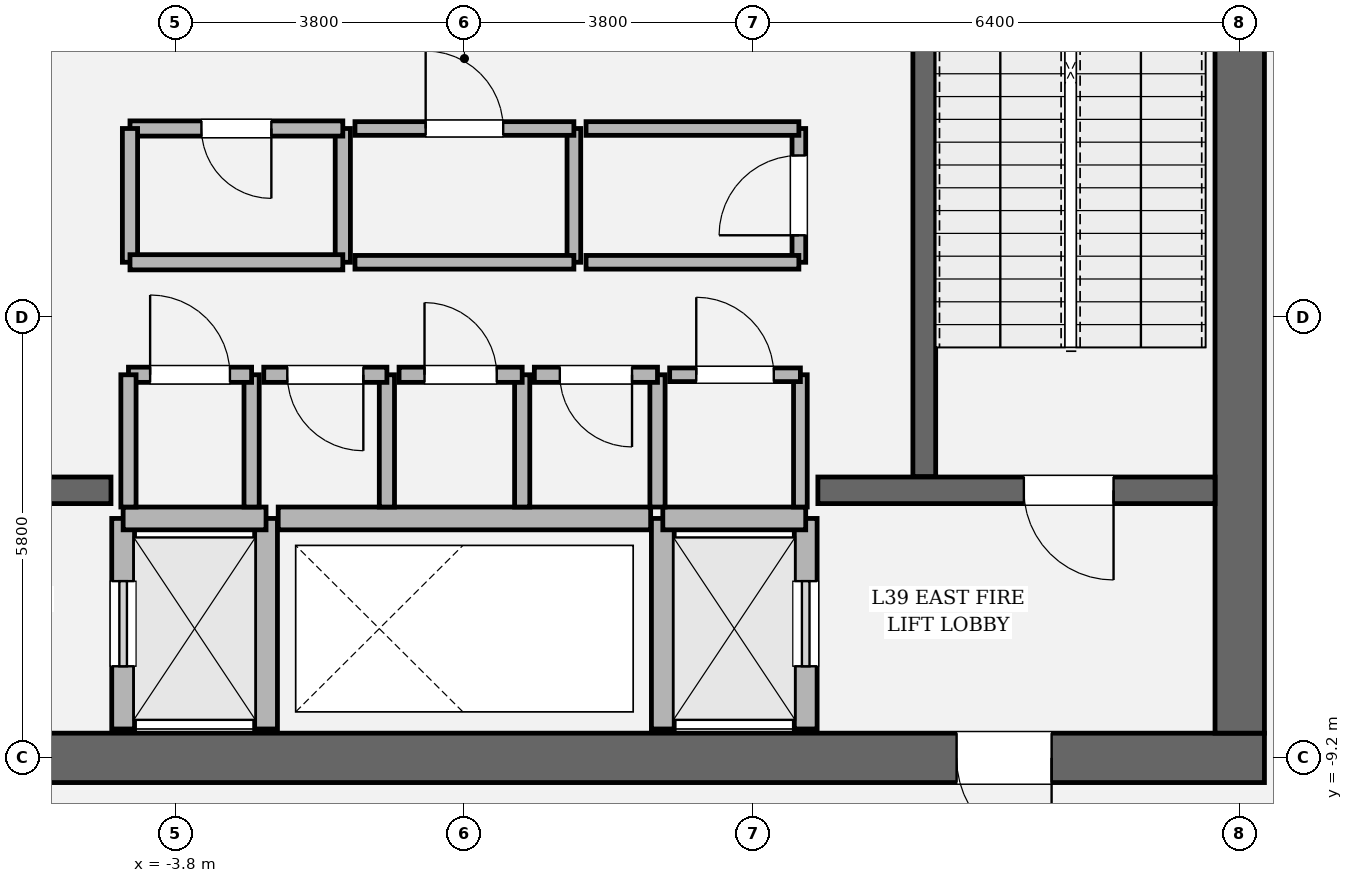
"""IFC4 building model, lengths in metres.
Left out: names, types, materials, properties, quantities, classifications, styles, units other than length and angle.
Written with IfcOpenShell. Run it as: python <this file> out.ifc"""

import sys

from ifc_helpers import new_model, si_unit, direction, frame, frame_2d, origin, place, context, subcontext, project, spatial, rectangle, extrude, element, fill, save


model = new_model("IFC4")
c1 = context("Model", 3, precision=1e-05, world=origin(), true_north=direction((0.0, 1.0)))
c2 = subcontext(c1, "Body", "Model", "MODEL_VIEW")
j1 = project(units=[si_unit("LENGTHUNIT", "METRE"), si_unit("PLANEANGLEUNIT", "RADIAN")], contexts=[c1])
p1 = place(None, origin())
s1 = spatial("IfcSite", under=j1, at=p1, CompositionType="ELEMENT")
p2 = place(p1, origin())
s2 = spatial("IfcBuilding", under=s1, at=p2, CompositionType="ELEMENT")
p3 = place(p2, frame((0.0, 0.0, 168.15)))
s3 = spatial("IfcBuildingStorey", under=s2, at=p3, CompositionType="ELEMENT", Elevation=168.15)
p4 = place(p3, frame((10.525, -9.2, 0.0), z_axis=(0.0, 0.0, 1.0), x_axis=(-1.0, 0.0, 0.0)))
e1 = element("IfcWall", 1, at=p4, inside=s3, PredefinedType="SHEAR", context=c2, shape_type="SweptSolid", body=[
    extrude(rectangle(XDim=21.05, YDim=0.65, at=frame_2d((10.525, 0.0))), origin(), (0.0, 0.0, 1.0), 4.05),
])
p5 = place(p4, frame((2.8, 0.0, 0.0)))
e2 = element("IfcOpeningElement", 2, at=p5, cuts=e1, PredefinedType="OPENING", context=c2, shape_type="SweptSolid", body=[
    extrude(rectangle(XDim=1.25, YDim=2.25, at=frame_2d((0.625, 1.125))), frame((0.0, 0.335, 0.0), z_axis=(0.0, -1.0, 0.0), x_axis=(1.0, 0.0, 0.0)), (0.0, 0.0, 1.0), 0.67),
])
p6 = place(p4, frame((17.0, 0.0, 0.0)))
e3 = element("IfcOpeningElement", 3, at=p6, cuts=e1, PredefinedType="OPENING", context=c2, shape_type="SweptSolid", body=[
    extrude(rectangle(XDim=1.25, YDim=2.25, at=frame_2d((0.625, 1.125))), frame((0.0, 0.335, 0.0), z_axis=(0.0, -1.0, 0.0), x_axis=(1.0, 0.0, 0.0)), (0.0, 0.0, 1.0), 0.67),
])
p7 = place(p3, frame((10.2, 8.875, 0.0), z_axis=(0.0, 0.0, 1.0), x_axis=(0.0, -1.0, 0.0)))
e4 = element("IfcWall", 4, at=p7, inside=s3, PredefinedType="SHEAR", context=c2, shape_type="SweptSolid", body=[
    extrude(rectangle(XDim=17.75, YDim=0.65, at=frame_2d((8.875, 0.0))), origin(), (0.0, 0.0, 1.0), 4.05),
])
p8 = place(p7, frame((3.905, 0.0, 0.0)))
e5 = element("IfcOpeningElement", 5, at=p8, cuts=e4, PredefinedType="OPENING", context=c2, shape_type="SweptSolid", body=[
    extrude(rectangle(XDim=1.18, YDim=2.2, at=frame_2d((0.59, 1.1))), frame((0.0, 0.335, 0.0), z_axis=(0.0, -1.0, 0.0), x_axis=(1.0, 0.0, 0.0)), (0.0, 0.0, 1.0), 0.67),
])
p9 = place(p3, frame((6.05, 3.45, 0.0), z_axis=(0.0, 0.0, 1.0), x_axis=(0.0, -1.0, 0.0)))
e6 = element("IfcWall", 6, at=p9, inside=s3, PredefinedType="SOLIDWALL", context=c2, shape_type="SweptSolid", body=[
    extrude(rectangle(XDim=8.95, YDim=0.3, at=frame_2d((4.475, 0.0))), origin(), (0.0, 0.0, 1.0), 4.05),
])
p10 = place(p3, frame((-9.875, -5.68, 0.0), z_axis=(0.0, 0.0, 1.0), x_axis=(1.0, 0.0, 0.0)))
e7 = element("IfcWall", 7, at=p10, inside=s3, PredefinedType="SOLIDWALL", context=c2, shape_type="SweptSolid", body=[
    extrude(rectangle(XDim=5.225, YDim=0.35, at=frame_2d((2.613, 0.0))), origin(), (0.0, 0.0, 1.0), 4.05),
])
p11 = place(p10, frame((1.335, 0.0, 0.0)))
e8 = element("IfcOpeningElement", 8, at=p11, cuts=e7, PredefinedType="OPENING", context=c2, shape_type="SweptSolid", body=[
    extrude(rectangle(XDim=1.18, YDim=2.2, at=frame_2d((0.59, 1.1))), frame((0.0, 0.185, 0.0), z_axis=(0.0, -1.0, 0.0), x_axis=(1.0, 0.0, 0.0)), (0.0, 0.0, 1.0), 0.37),
])
p12 = place(p3, frame((4.65, -5.68, 0.0), z_axis=(0.0, 0.0, 1.0), x_axis=(1.0, 0.0, 0.0)))
e9 = element("IfcWall", 9, at=p12, inside=s3, PredefinedType="SOLIDWALL", context=c2, shape_type="SweptSolid", body=[
    extrude(rectangle(XDim=5.225, YDim=0.35, at=frame_2d((2.613, 0.0))), origin(), (0.0, 0.0, 1.0), 4.05),
])
p13 = place(p12, frame((2.71, 0.0, 0.0)))
e10 = element("IfcOpeningElement", 10, at=p13, cuts=e9, PredefinedType="OPENING", context=c2, shape_type="SweptSolid", body=[
    extrude(rectangle(XDim=1.18, YDim=2.2, at=frame_2d((0.59, 1.1))), frame((0.0, 0.185, 0.0), z_axis=(0.0, -1.0, 0.0), x_axis=(1.0, 0.0, 0.0)), (0.0, 0.0, 1.0), 0.37),
])
p14 = place(p3, frame((-4.49, -8.82, 0.0), z_axis=(0.0, 0.0, 1.0), x_axis=(0.0, 1.0, 0.0)))
e11 = element("IfcWall", 11, at=p14, inside=s3, PredefinedType="SOLIDWALL", context=c2, shape_type="SweptSolid", body=[
    extrude(rectangle(XDim=2.77, YDim=0.3, at=frame_2d((1.385, 0.0))), origin(), (0.0, 0.0, 1.0), 3.77),
])
p15 = place(p14, frame((0.825, 0.0, 0.0)))
e12 = element("IfcOpeningElement", 12, at=p15, cuts=e11, PredefinedType="OPENING", context=c2, shape_type="SweptSolid", body=[
    extrude(rectangle(XDim=1.12, YDim=2.25, at=frame_2d((0.56, 1.125))), frame((0.0, 0.16, 0.0), z_axis=(0.0, -1.0, 0.0), x_axis=(1.0, 0.0, 0.0)), (0.0, 0.0, 1.0), 0.32),
])
p16 = place(p3, frame((-2.61, -8.82, 0.0), z_axis=(0.0, 0.0, 1.0), x_axis=(0.0, 1.0, 0.0)))
e13 = element("IfcWall", 13, at=p16, inside=s3, PredefinedType="SOLIDWALL", context=c2, shape_type="SweptSolid", body=[
    extrude(rectangle(XDim=2.77, YDim=0.3, at=frame_2d((1.385, 0.0))), origin(), (0.0, 0.0, 1.0), 3.77),
])
p17 = place(p3, frame((-4.49, -6.05, 0.0), z_axis=(0.0, 0.0, 1.0), x_axis=(1.0, 0.0, 0.0)))
e14 = element("IfcWall", 14, at=p17, inside=s3, PredefinedType="SOLIDWALL", context=c2, shape_type="SweptSolid", body=[
    extrude(rectangle(XDim=1.88, YDim=0.3, at=frame_2d((0.94, 0.0))), origin(), (0.0, 0.0, 1.0), 3.77),
])
p18 = place(p3, frame((4.49, -8.82, 0.0), z_axis=(0.0, 0.0, 1.0), x_axis=(0.0, 1.0, 0.0)))
e15 = element("IfcWall", 15, at=p18, inside=s3, PredefinedType="SOLIDWALL", context=c2, shape_type="SweptSolid", body=[
    extrude(rectangle(XDim=2.77, YDim=0.3, at=frame_2d((1.385, 0.0))), origin(), (0.0, 0.0, 1.0), 3.77),
])
p19 = place(p18, frame((0.825, 0.0, 0.0)))
e16 = element("IfcOpeningElement", 16, at=p19, cuts=e15, PredefinedType="OPENING", context=c2, shape_type="SweptSolid", body=[
    extrude(rectangle(XDim=1.12, YDim=2.25, at=frame_2d((0.56, 1.125))), frame((0.0, 0.16, 0.0), z_axis=(0.0, -1.0, 0.0), x_axis=(1.0, 0.0, 0.0)), (0.0, 0.0, 1.0), 0.32),
])
p20 = place(p3, frame((2.61, -8.82, 0.0), z_axis=(0.0, 0.0, 1.0), x_axis=(0.0, 1.0, 0.0)))
e17 = element("IfcWall", 17, at=p20, inside=s3, PredefinedType="SOLIDWALL", context=c2, shape_type="SweptSolid", body=[
    extrude(rectangle(XDim=2.77, YDim=0.3, at=frame_2d((1.385, 0.0))), origin(), (0.0, 0.0, 1.0), 3.77),
])
p21 = place(p3, frame((2.61, -6.05, 0.0), z_axis=(0.0, 0.0, 1.0), x_axis=(1.0, 0.0, 0.0)))
e18 = element("IfcWall", 18, at=p21, inside=s3, PredefinedType="SOLIDWALL", context=c2, shape_type="SweptSolid", body=[
    extrude(rectangle(XDim=1.88, YDim=0.3, at=frame_2d((0.94, 0.0))), origin(), (0.0, 0.0, 1.0), 3.77),
])
p22 = place(p3, frame((-2.45, -6.05, 0.0), z_axis=(0.0, 0.0, 1.0), x_axis=(1.0, 0.0, 0.0)))
e19 = element("IfcWall", 19, at=p22, inside=s3, PredefinedType="SOLIDWALL", context=c2, shape_type="SweptSolid", body=[
    extrude(rectangle(XDim=4.9, YDim=0.3, at=frame_2d((2.45, 0.0))), origin(), (0.0, 0.0, 1.0), 3.77),
])
p23 = place(p3, frame((-2.8, -5.9, 0.0), z_axis=(0.0, 0.0, 1.0), x_axis=(0.0, 1.0, 0.0)))
e20 = element("IfcWall", 20, at=p23, inside=s3, PredefinedType="SOLIDWALL", context=c2, shape_type="SweptSolid", body=[
    extrude(rectangle(XDim=1.74, YDim=0.2, at=frame_2d((0.87, 0.0))), origin(), (0.0, 0.0, 1.0), 3.77),
])
p24 = place(p3, frame((-2.8, -4.16, 0.0), z_axis=(0.0, 0.0, 1.0), x_axis=(-1.0, 0.0, 0.0)))
e21 = element("IfcWall", 21, at=p24, inside=s3, PredefinedType="SOLIDWALL", context=c2, shape_type="SweptSolid", body=[
    extrude(rectangle(XDim=1.62, YDim=0.2, at=frame_2d((0.81, 0.0))), origin(), (0.0, 0.0, 1.0), 3.77),
])
p25 = place(p24, frame((0.285, 0.0, 0.0)))
e22 = element("IfcOpeningElement", 22, at=p25, cuts=e21, PredefinedType="OPENING", context=c2, shape_type="SweptSolid", body=[
    extrude(rectangle(XDim=1.05, YDim=2.2, at=frame_2d((0.525, 1.1))), frame((0.0, 0.11, 0.0), z_axis=(0.0, -1.0, 0.0), x_axis=(1.0, 0.0, 0.0)), (0.0, 0.0, 1.0), 0.22),
])
for number, where, z_axis, x_axis in (
    (23, (-4.42, -4.16, 0.0), (0.0, 0.0, 1.0), (0.0, -1.0, 0.0)),
    (24, (-1.02, -5.9, 0.0), (0.0, 0.0, 1.0), (0.0, 1.0, 0.0)),
):
    element("IfcWall", number, at=place(p3, frame(where, z_axis=z_axis, x_axis=x_axis)), inside=s3, PredefinedType="SOLIDWALL", context=c2, shape_type="SweptSolid", body=[
        extrude(rectangle(XDim=1.74, YDim=0.2, at=frame_2d((0.87, 0.0))), origin(), (0.0, 0.0, 1.0), 3.77),
    ])
p26 = place(p3, frame((-1.02, -4.16, 0.0), z_axis=(0.0, 0.0, 1.0), x_axis=(-1.0, 0.0, 0.0)))
e25 = element("IfcWall", 25, at=p26, inside=s3, PredefinedType="SOLIDWALL", context=c2, shape_type="SweptSolid", body=[
    extrude(rectangle(XDim=1.62, YDim=0.2, at=frame_2d((0.81, 0.0))), origin(), (0.0, 0.0, 1.0), 3.77),
])
p27 = place(p26, frame((0.31, 0.0, 0.0)))
e26 = element("IfcOpeningElement", 26, at=p27, cuts=e25, PredefinedType="OPENING", context=c2, shape_type="SweptSolid", body=[
    extrude(rectangle(XDim=1.0, YDim=2.15, at=frame_2d((0.5, 1.075))), frame((0.0, 0.11, 0.0), z_axis=(0.0, -1.0, 0.0), x_axis=(1.0, 0.0, 0.0)), (0.0, 0.0, 1.0), 0.22),
])
p28 = place(p3, frame((0.76, -5.9, 0.0), z_axis=(0.0, 0.0, 1.0), x_axis=(0.0, 1.0, 0.0)))
e27 = element("IfcWall", 27, at=p28, inside=s3, PredefinedType="SOLIDWALL", context=c2, shape_type="SweptSolid", body=[
    extrude(rectangle(XDim=1.74, YDim=0.2, at=frame_2d((0.87, 0.0))), origin(), (0.0, 0.0, 1.0), 3.77),
])
p29 = place(p3, frame((0.76, -4.16, 0.0), z_axis=(0.0, 0.0, 1.0), x_axis=(-1.0, 0.0, 0.0)))
e28 = element("IfcWall", 28, at=p29, inside=s3, PredefinedType="SOLIDWALL", context=c2, shape_type="SweptSolid", body=[
    extrude(rectangle(XDim=1.62, YDim=0.2, at=frame_2d((0.81, 0.0))), origin(), (0.0, 0.0, 1.0), 3.77),
])
p30 = place(p29, frame((0.335, 0.0, 0.0)))
e29 = element("IfcOpeningElement", 29, at=p30, cuts=e28, PredefinedType="OPENING", context=c2, shape_type="SweptSolid", body=[
    extrude(rectangle(XDim=0.95, YDim=2.15, at=frame_2d((0.475, 1.075))), frame((0.0, 0.11, 0.0), z_axis=(0.0, -1.0, 0.0), x_axis=(1.0, 0.0, 0.0)), (0.0, 0.0, 1.0), 0.22),
])
p31 = place(p3, frame((2.54, -5.9, 0.0), z_axis=(0.0, 0.0, 1.0), x_axis=(0.0, 1.0, 0.0)))
e30 = element("IfcWall", 30, at=p31, inside=s3, PredefinedType="SOLIDWALL", context=c2, shape_type="SweptSolid", body=[
    extrude(rectangle(XDim=1.74, YDim=0.2, at=frame_2d((0.87, 0.0))), origin(), (0.0, 0.0, 1.0), 3.77),
])
p32 = place(p3, frame((2.54, -4.16, 0.0), z_axis=(0.0, 0.0, 1.0), x_axis=(-1.0, 0.0, 0.0)))
e31 = element("IfcWall", 31, at=p32, inside=s3, PredefinedType="SOLIDWALL", context=c2, shape_type="SweptSolid", body=[
    extrude(rectangle(XDim=1.62, YDim=0.2, at=frame_2d((0.81, 0.0))), origin(), (0.0, 0.0, 1.0), 3.77),
])
p33 = place(p32, frame((0.335, 0.0, 0.0)))
e32 = element("IfcOpeningElement", 32, at=p33, cuts=e31, PredefinedType="OPENING", context=c2, shape_type="SweptSolid", body=[
    extrude(rectangle(XDim=0.95, YDim=2.15, at=frame_2d((0.475, 1.075))), frame((0.0, 0.11, 0.0), z_axis=(0.0, -1.0, 0.0), x_axis=(1.0, 0.0, 0.0)), (0.0, 0.0, 1.0), 0.22),
])
p34 = place(p3, frame((4.42, -5.9, 0.0), z_axis=(0.0, 0.0, 1.0), x_axis=(0.0, 1.0, 0.0)))
e33 = element("IfcWall", 33, at=p34, inside=s3, PredefinedType="PARTITIONING", context=c2, shape_type="SweptSolid", body=[
    extrude(rectangle(XDim=1.74, YDim=0.18, at=frame_2d((0.87, 0.0))), origin(), (0.0, 0.0, 1.0), 3.77),
])
p35 = place(p3, frame((4.42, -4.16, 0.0), z_axis=(0.0, 0.0, 1.0), x_axis=(-1.0, 0.0, 0.0)))
e34 = element("IfcWall", 34, at=p35, inside=s3, PredefinedType="PARTITIONING", context=c2, shape_type="SweptSolid", body=[
    extrude(rectangle(XDim=1.72, YDim=0.18, at=frame_2d((0.86, 0.0))), origin(), (0.0, 0.0, 1.0), 3.77),
])
p36 = place(p35, frame((0.35, 0.0, 0.0)))
e35 = element("IfcOpeningElement", 35, at=p36, cuts=e34, PredefinedType="OPENING", context=c2, shape_type="SweptSolid", body=[
    extrude(rectangle(XDim=1.02, YDim=2.2, at=frame_2d((0.51, 1.1))), frame((0.0, 0.1, 0.0), z_axis=(0.0, -1.0, 0.0), x_axis=(1.0, 0.0, 0.0)), (0.0, 0.0, 1.0), 0.2),
])
p37 = place(p3, frame((-1.6, -2.68, 0.0), z_axis=(0.0, 0.0, 1.0), x_axis=(0.0, 1.0, 0.0)))
e36 = element("IfcWall", 36, at=p37, inside=s3, PredefinedType="SOLIDWALL", context=c2, shape_type="SweptSolid", body=[
    extrude(rectangle(XDim=1.76, YDim=0.2, at=frame_2d((0.88, 0.0))), origin(), (0.0, 0.0, 1.0), 3.77),
])
p38 = place(p3, frame((-1.6, -0.92, 0.0), z_axis=(0.0, 0.0, 1.0), x_axis=(-1.0, 0.0, 0.0)))
e37 = element("IfcWall", 37, at=p38, inside=s3, PredefinedType="SOLIDWALL", context=c2, shape_type="SweptSolid", body=[
    extrude(rectangle(XDim=2.8, YDim=0.2, at=frame_2d((1.4, 0.0))), origin(), (0.0, 0.0, 1.0), 3.77),
])
p39 = place(p38, frame((0.94, 0.0, 0.0)))
e38 = element("IfcOpeningElement", 38, at=p39, cuts=e37, PredefinedType="OPENING", context=c2, shape_type="SweptSolid", body=[
    extrude(rectangle(XDim=0.92, YDim=2.1, at=frame_2d((0.46, 1.05))), frame((0.0, 0.11, 0.0), z_axis=(0.0, -1.0, 0.0), x_axis=(1.0, 0.0, 0.0)), (0.0, 0.0, 1.0), 0.22),
])
p40 = place(p3, frame((-4.4, -0.92, 0.0), z_axis=(0.0, 0.0, 1.0), x_axis=(0.0, -1.0, 0.0)))
e39 = element("IfcWall", 39, at=p40, inside=s3, PredefinedType="SOLIDWALL", context=c2, shape_type="SweptSolid", body=[
    extrude(rectangle(XDim=1.76, YDim=0.2, at=frame_2d((0.88, 0.0))), origin(), (0.0, 0.0, 1.0), 3.77),
])
p41 = place(p3, frame((-4.4, -2.68, 0.0), z_axis=(0.0, 0.0, 1.0), x_axis=(1.0, 0.0, 0.0)))
e40 = element("IfcWall", 40, at=p41, inside=s3, PredefinedType="SOLIDWALL", context=c2, shape_type="SweptSolid", body=[
    extrude(rectangle(XDim=2.8, YDim=0.2, at=frame_2d((1.4, 0.0))), origin(), (0.0, 0.0, 1.0), 3.77),
])
p42 = place(p3, frame((1.44, -2.68, 0.0), z_axis=(0.0, 0.0, 1.0), x_axis=(0.0, 1.0, 0.0)))
e41 = element("IfcWall", 41, at=p42, inside=s3, PredefinedType="PARTITIONING", context=c2, shape_type="SweptSolid", body=[
    extrude(rectangle(XDim=1.76, YDim=0.18, at=frame_2d((0.88, 0.0))), origin(), (0.0, 0.0, 1.0), 3.77),
])
p43 = place(p3, frame((1.44, -0.92, 0.0), z_axis=(0.0, 0.0, 1.0), x_axis=(-1.0, 0.0, 0.0)))
e42 = element("IfcWall", 42, at=p43, inside=s3, PredefinedType="PARTITIONING", context=c2, shape_type="SweptSolid", body=[
    extrude(rectangle(XDim=2.88, YDim=0.18, at=frame_2d((1.44, 0.0))), origin(), (0.0, 0.0, 1.0), 3.77),
])
p44 = place(p43, frame((0.93, 0.0, 0.0)))
e43 = element("IfcOpeningElement", 43, at=p44, cuts=e42, PredefinedType="OPENING", context=c2, shape_type="SweptSolid", body=[
    extrude(rectangle(XDim=1.02, YDim=2.2, at=frame_2d((0.51, 1.1))), frame((0.0, 0.1, 0.0), z_axis=(0.0, -1.0, 0.0), x_axis=(1.0, 0.0, 0.0)), (0.0, 0.0, 1.0), 0.2),
])
p45 = place(p3, frame((-1.44, -2.68, 0.0), z_axis=(0.0, 0.0, 1.0), x_axis=(1.0, 0.0, 0.0)))
e44 = element("IfcWall", 44, at=p45, inside=s3, PredefinedType="PARTITIONING", context=c2, shape_type="SweptSolid", body=[
    extrude(rectangle(XDim=2.88, YDim=0.18, at=frame_2d((1.44, 0.0))), origin(), (0.0, 0.0, 1.0), 3.77),
])
p46 = place(p3, frame((4.4, -2.68, 0.0), z_axis=(0.0, 0.0, 1.0), x_axis=(0.0, 1.0, 0.0)))
e45 = element("IfcWall", 45, at=p46, inside=s3, PredefinedType="PARTITIONING", context=c2, shape_type="SweptSolid", body=[
    extrude(rectangle(XDim=1.76, YDim=0.18, at=frame_2d((0.88, 0.0))), origin(), (0.0, 0.0, 1.0), 3.77),
])
p47 = place(p46, frame((0.355, 0.0, 0.0)))
e46 = element("IfcOpeningElement", 46, at=p47, cuts=e45, PredefinedType="OPENING", context=c2, shape_type="SweptSolid", body=[
    extrude(rectangle(XDim=1.05, YDim=2.2, at=frame_2d((0.525, 1.1))), frame((0.0, 0.1, 0.0), z_axis=(0.0, -1.0, 0.0), x_axis=(1.0, 0.0, 0.0)), (0.0, 0.0, 1.0), 0.2),
])
for number, where, z_axis, x_axis in (
    (47, (4.4, -0.92, 0.0), (0.0, 0.0, 1.0), (-1.0, 0.0, 0.0)),
    (48, (1.6, -2.68, 0.0), (0.0, 0.0, 1.0), (1.0, 0.0, 0.0)),
):
    element("IfcWall", number, at=place(p3, frame(where, z_axis=z_axis, x_axis=x_axis)), inside=s3, PredefinedType="PARTITIONING", context=c2, shape_type="SweptSolid", body=[
        extrude(rectangle(XDim=2.8, YDim=0.18, at=frame_2d((1.4, 0.0))), origin(), (0.0, 0.0, 1.0), 3.77),
    ])
p48 = place(p13, origin())
e49 = element("IfcDoor", 49, at=p48, inside=s3, OperationType="SINGLE_SWING_RIGHT", PredefinedType="DOOR", context=c2, shape_type="SweptSolid", body=[
    extrude(rectangle(XDim=1.18, YDim=2.2, at=frame_2d((0.59, 1.1))), frame((0.0, 0.025, 0.0), z_axis=(0.0, -1.0, 0.0), x_axis=(1.0, 0.0, 0.0)), (0.0, 0.0, 1.0), 0.05),
])
fill(e10, e49)
p49 = place(p5, origin())
e50 = element("IfcDoor", 50, at=p49, inside=s3, OperationType="SINGLE_SWING_LEFT", PredefinedType="DOOR", context=c2, shape_type="SweptSolid", body=[
    extrude(rectangle(XDim=1.25, YDim=2.25, at=frame_2d((0.625, 1.125))), frame((0.0, 0.025, 0.0), z_axis=(0.0, -1.0, 0.0), x_axis=(1.0, 0.0, 0.0)), (0.0, 0.0, 1.0), 0.05),
])
fill(e2, e50)
p50 = place(p15, origin())
e51 = element("IfcDoor", 51, at=p50, inside=s3, OperationType="SLIDING_TO_LEFT", PredefinedType="DOOR", context=c2, shape_type="SweptSolid", body=[
    extrude(rectangle(XDim=1.12, YDim=2.25, at=frame_2d((0.56, 1.125))), frame((0.0, 0.025, 0.0), z_axis=(0.0, -1.0, 0.0), x_axis=(1.0, 0.0, 0.0)), (0.0, 0.0, 1.0), 0.05),
])
fill(e12, e51)
p51 = place(p19, origin())
e52 = element("IfcDoor", 52, at=p51, inside=s3, OperationType="SLIDING_TO_RIGHT", PredefinedType="DOOR", context=c2, shape_type="SweptSolid", body=[
    extrude(rectangle(XDim=1.12, YDim=2.25, at=frame_2d((0.56, 1.125))), frame((0.0, 0.025, 0.0), z_axis=(0.0, -1.0, 0.0), x_axis=(1.0, 0.0, 0.0)), (0.0, 0.0, 1.0), 0.05),
])
fill(e16, e52)
p52 = place(p25, origin())
e53 = element("IfcDoor", 53, at=p52, inside=s3, OperationType="SINGLE_SWING_RIGHT", PredefinedType="DOOR", context=c2, shape_type="SweptSolid", body=[
    extrude(rectangle(XDim=1.05, YDim=2.2, at=frame_2d((0.525, 1.1))), frame((0.0, 0.025, 0.0), z_axis=(0.0, -1.0, 0.0), x_axis=(1.0, 0.0, 0.0)), (0.0, 0.0, 1.0), 0.05),
])
fill(e22, e53)
p53 = place(p27, origin())
e54 = element("IfcDoor", 54, at=p53, inside=s3, OperationType="SINGLE_SWING_LEFT", PredefinedType="DOOR", context=c2, shape_type="SweptSolid", body=[
    extrude(rectangle(XDim=1.0, YDim=2.15, at=frame_2d((0.5, 1.075))), frame((0.0, 0.025, 0.0), z_axis=(0.0, -1.0, 0.0), x_axis=(1.0, 0.0, 0.0)), (0.0, 0.0, 1.0), 0.05),
])
fill(e26, e54)
p54 = place(p30, origin())
e55 = element("IfcDoor", 55, at=p54, inside=s3, OperationType="SINGLE_SWING_RIGHT", PredefinedType="DOOR", context=c2, shape_type="SweptSolid", body=[
    extrude(rectangle(XDim=0.95, YDim=2.15, at=frame_2d((0.475, 1.075))), frame((0.0, 0.025, 0.0), z_axis=(0.0, -1.0, 0.0), x_axis=(1.0, 0.0, 0.0)), (0.0, 0.0, 1.0), 0.05),
])
fill(e29, e55)
p55 = place(p33, origin())
e56 = element("IfcDoor", 56, at=p55, inside=s3, OperationType="SINGLE_SWING_LEFT", PredefinedType="DOOR", context=c2, shape_type="SweptSolid", body=[
    extrude(rectangle(XDim=0.95, YDim=2.15, at=frame_2d((0.475, 1.075))), frame((0.0, 0.025, 0.0), z_axis=(0.0, -1.0, 0.0), x_axis=(1.0, 0.0, 0.0)), (0.0, 0.0, 1.0), 0.05),
])
fill(e32, e56)
p56 = place(p36, origin())
e57 = element("IfcDoor", 57, at=p56, inside=s3, OperationType="SINGLE_SWING_RIGHT", PredefinedType="DOOR", context=c2, shape_type="SweptSolid", body=[
    extrude(rectangle(XDim=1.02, YDim=2.2, at=frame_2d((0.51, 1.1))), frame((0.0, 0.025, 0.0), z_axis=(0.0, -1.0, 0.0), x_axis=(1.0, 0.0, 0.0)), (0.0, 0.0, 1.0), 0.05),
])
fill(e35, e57)
p57 = place(p39, origin())
e58 = element("IfcDoor", 58, at=p57, inside=s3, OperationType="SINGLE_SWING_LEFT", PredefinedType="DOOR", context=c2, shape_type="SweptSolid", body=[
    extrude(rectangle(XDim=0.92, YDim=2.1, at=frame_2d((0.46, 1.05))), frame((0.0, 0.025, 0.0), z_axis=(0.0, -1.0, 0.0), x_axis=(1.0, 0.0, 0.0)), (0.0, 0.0, 1.0), 0.05),
])
fill(e38, e58)
p58 = place(p44, origin())
e59 = element("IfcDoor", 59, at=p58, inside=s3, OperationType="SINGLE_SWING_RIGHT", PredefinedType="DOOR", context=c2, shape_type="SweptSolid", body=[
    extrude(rectangle(XDim=1.02, YDim=2.2, at=frame_2d((0.51, 1.1))), frame((0.0, 0.025, 0.0), z_axis=(0.0, -1.0, 0.0), x_axis=(1.0, 0.0, 0.0)), (0.0, 0.0, 1.0), 0.05),
])
fill(e43, e59)
p59 = place(p47, origin())
e60 = element("IfcDoor", 60, at=p59, inside=s3, OperationType="SINGLE_SWING_LEFT", PredefinedType="DOOR", context=c2, shape_type="SweptSolid", body=[
    extrude(rectangle(XDim=1.05, YDim=2.2, at=frame_2d((0.525, 1.1))), frame((0.0, 0.025, 0.0), z_axis=(0.0, -1.0, 0.0), x_axis=(1.0, 0.0, 0.0)), (0.0, 0.0, 1.0), 0.05),
])
fill(e46, e60)
save(model, sys.argv[1])
